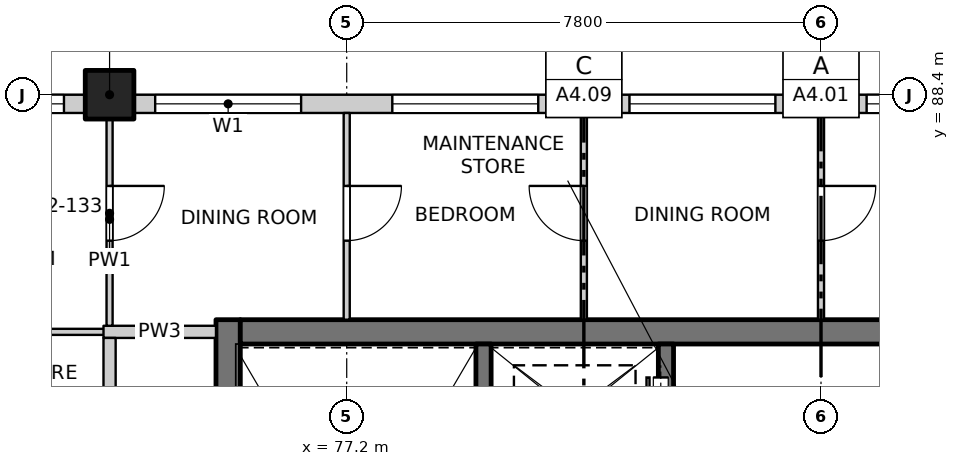
"""IFC4 building model, lengths in metres.
Left out: names, types, materials, properties, quantities, classifications, styles, units other than length and angle.
Written with IfcOpenShell. Run it as: python <this file> out.ifc"""

import sys

from ifc_helpers import new_model, si_unit, direction, frame, frame_2d, origin, origin_2d, place, context, subcontext, project, spatial, rectangle, extrude, element, fill, save


model = new_model("IFC4")
c1 = context("Model", 3, precision=1e-05, world=origin(), true_north=direction((0.0, 1.0)))
c2 = subcontext(c1, "Body", "Model", "MODEL_VIEW")
j1 = project(units=[si_unit("LENGTHUNIT", "METRE"), si_unit("PLANEANGLEUNIT", "RADIAN")], contexts=[c1])
p1 = place(None, origin())
s1 = spatial("IfcSite", under=j1, at=p1, CompositionType="ELEMENT")
p2 = place(p1, origin())
s2 = spatial("IfcBuilding", under=s1, at=p2, CompositionType="ELEMENT")
p3 = place(p2, frame((0.0, 0.0, 224.5)))
s3 = spatial("IfcBuildingStorey", under=s2, at=p3, CompositionType="ELEMENT", Elevation=224.5)
p4 = place(p3, frame((73.3, 88.4, -0.25), z_axis=(0.0, 0.0, 1.0), x_axis=(1.0, 0.0, 0.0)))
e1 = element("IfcColumn", 1, at=p4, inside=s3, PredefinedType="COLUMN", context=c2, shape_type="SweptSolid", body=[
    extrude(rectangle(XDim=0.8, YDim=0.8, at=origin_2d()), origin(), (0.0, 0.0, 1.0), 3.4),
])
p5 = place(p3, frame((75.25, 77.3, -0.25), z_axis=(0.0, 0.0, 1.0), x_axis=(0.0, 1.0, 0.0)))
e2 = element("IfcWall", 2, at=p5, inside=s3, PredefinedType="SOLIDWALL", context=c2, shape_type="SweptSolid", body=[
    extrude(rectangle(XDim=7.4, YDim=0.4, at=frame_2d((3.7, 0.0))), origin(), (0.0, 0.0, 1.0), 3.4),
])
p6 = place(p5, frame((0.3, 0.0, 0.25)))
e3 = element("IfcOpeningElement", 3, at=p6, cuts=e2, PredefinedType="OPENING", context=c2, shape_type="SweptSolid", body=[
    extrude(rectangle(XDim=1.2, YDim=2.1, at=frame_2d((0.6, 1.05))), frame((0.0, 0.21, 0.0), z_axis=(0.0, -1.0, 0.0), x_axis=(1.0, 0.0, 0.0)), (0.0, 0.0, 1.0), 0.42),
])
p7 = place(p3, frame((75.45, 84.5, -0.25), z_axis=(0.0, 0.0, 1.0), x_axis=(1.0, 0.0, 0.0)))
e4 = element("IfcWall", 4, at=p7, inside=s3, PredefinedType="SOLIDWALL", context=c2, shape_type="SweptSolid", body=[
    extrude(rectangle(XDim=19.1, YDim=0.4, at=frame_2d((9.55, 0.0))), origin(), (0.0, 0.0, 1.0), 3.4),
])
p8 = place(p3, frame((79.45, 77.3, -0.25), z_axis=(0.0, 0.0, 1.0), x_axis=(0.0, 1.0, 0.0)))
e5 = element("IfcWall", 5, at=p8, inside=s3, PredefinedType="SOLIDWALL", context=c2, shape_type="SweptSolid", body=[
    extrude(rectangle(XDim=7.0, YDim=0.25, at=frame_2d((3.5, 0.0))), origin(), (0.0, 0.0, 1.0), 3.4),
])
p9 = place(p3, frame((82.45, 82.025, -0.25), z_axis=(0.0, 0.0, 1.0), x_axis=(0.0, 1.0, 0.0)))
e6 = element("IfcWall", 6, at=p9, inside=s3, PredefinedType="SOLIDWALL", context=c2, shape_type="SweptSolid", body=[
    extrude(rectangle(XDim=2.275, YDim=0.25, at=frame_2d((1.138, 0.0))), origin(), (0.0, 0.0, 1.0), 3.4),
])
p10 = place(p9, frame((0.625, 0.0, 0.25)))
e7 = element("IfcOpeningElement", 7, at=p10, cuts=e6, PredefinedType="OPENING", context=c2, shape_type="SweptSolid", body=[
    extrude(rectangle(XDim=1.1, YDim=2.1, at=frame_2d((0.55, 1.05))), frame((0.0, 0.135, 0.0), z_axis=(0.0, -1.0, 0.0), x_axis=(1.0, 0.0, 0.0)), (0.0, 0.0, 1.0), 0.27),
])
p11 = place(p3, frame((65.5, 88.25, 0.0), z_axis=(0.0, 0.0, 1.0), x_axis=(1.0, 0.0, 0.0)))
e8 = element("IfcWall", 8, at=p11, inside=s3, PredefinedType="SOLIDWALL", context=c2, shape_type="SweptSolid", body=[
    extrude(rectangle(XDim=7.4, YDim=0.3, at=frame_2d((3.7, 0.0))), origin(), (0.0, 0.0, 1.0), 2.7),
])
p12 = place(p11, frame((0.75, 0.0, 0.9)))
e9 = element("IfcOpeningElement", 9, at=p12, cuts=e8, PredefinedType="OPENING", context=c2, shape_type="SweptSolid", body=[
    extrude(rectangle(XDim=2.4, YDim=1.8, at=frame_2d((1.2, 0.9))), frame((0.0, 0.16, 0.0), z_axis=(0.0, -1.0, 0.0), x_axis=(1.0, 0.0, 0.0)), (0.0, 0.0, 1.0), 0.32),
])
p13 = place(p11, frame((4.65, 0.0, 0.9)))
e10 = element("IfcOpeningElement", 10, at=p13, cuts=e8, PredefinedType="OPENING", context=c2, shape_type="SweptSolid", body=[
    extrude(rectangle(XDim=2.4, YDim=1.8, at=frame_2d((1.2, 0.9))), frame((0.0, 0.16, 0.0), z_axis=(0.0, -1.0, 0.0), x_axis=(1.0, 0.0, 0.0)), (0.0, 0.0, 1.0), 0.32),
])
p14 = place(p3, frame((73.7, 88.25, 0.0), z_axis=(0.0, 0.0, 1.0), x_axis=(1.0, 0.0, 0.0)))
e11 = element("IfcWall", 11, at=p14, inside=s3, PredefinedType="SOLIDWALL", context=c2, shape_type="SweptSolid", body=[
    extrude(rectangle(XDim=22.6, YDim=0.3, at=frame_2d((11.3, 0.0))), origin(), (0.0, 0.0, 1.0), 2.7),
])
p15 = place(p14, frame((0.35, 0.0, 0.9)))
e12 = element("IfcOpeningElement", 12, at=p15, cuts=e11, PredefinedType="OPENING", context=c2, shape_type="SweptSolid", body=[
    extrude(rectangle(XDim=2.4, YDim=1.8, at=frame_2d((1.2, 0.9))), frame((0.0, 0.16, 0.0), z_axis=(0.0, -1.0, 0.0), x_axis=(1.0, 0.0, 0.0)), (0.0, 0.0, 1.0), 0.32),
])
p16 = place(p14, frame((4.25, 0.0, 0.9)))
e13 = element("IfcOpeningElement", 13, at=p16, cuts=e11, PredefinedType="OPENING", context=c2, shape_type="SweptSolid", body=[
    extrude(rectangle(XDim=2.4, YDim=1.8, at=frame_2d((1.2, 0.9))), frame((0.0, 0.16, 0.0), z_axis=(0.0, -1.0, 0.0), x_axis=(1.0, 0.0, 0.0)), (0.0, 0.0, 1.0), 0.32),
])
p17 = place(p14, frame((8.15, 0.0, 0.9)))
e14 = element("IfcOpeningElement", 14, at=p17, cuts=e11, PredefinedType="OPENING", context=c2, shape_type="SweptSolid", body=[
    extrude(rectangle(XDim=2.4, YDim=1.8, at=frame_2d((1.2, 0.9))), frame((0.0, 0.16, 0.0), z_axis=(0.0, -1.0, 0.0), x_axis=(1.0, 0.0, 0.0)), (0.0, 0.0, 1.0), 0.32),
])
p18 = place(p14, frame((12.05, 0.0, 0.9)))
e15 = element("IfcOpeningElement", 15, at=p18, cuts=e11, PredefinedType="OPENING", context=c2, shape_type="SweptSolid", body=[
    extrude(rectangle(XDim=2.4, YDim=1.8, at=frame_2d((1.2, 0.9))), frame((0.0, 0.16, 0.0), z_axis=(0.0, -1.0, 0.0), x_axis=(1.0, 0.0, 0.0)), (0.0, 0.0, 1.0), 0.32),
])
p19 = place(p14, frame((15.95, 0.0, 0.9)))
e16 = element("IfcOpeningElement", 16, at=p19, cuts=e11, PredefinedType="OPENING", context=c2, shape_type="SweptSolid", body=[
    extrude(rectangle(XDim=2.4, YDim=1.8, at=frame_2d((1.2, 0.9))), frame((0.0, 0.16, 0.0), z_axis=(0.0, -1.0, 0.0), x_axis=(1.0, 0.0, 0.0)), (0.0, 0.0, 1.0), 0.32),
])
p20 = place(p14, frame((19.85, 0.0, 0.9)))
e17 = element("IfcOpeningElement", 17, at=p20, cuts=e11, PredefinedType="OPENING", context=c2, shape_type="SweptSolid", body=[
    extrude(rectangle(XDim=2.4, YDim=1.8, at=frame_2d((1.2, 0.9))), frame((0.0, 0.16, 0.0), z_axis=(0.0, -1.0, 0.0), x_axis=(1.0, 0.0, 0.0)), (0.0, 0.0, 1.0), 0.32),
])
p21 = place(p3, frame((61.9, 84.5, 0.0), z_axis=(0.0, 0.0, 1.0), x_axis=(1.0, 0.0, 0.0)))
e18 = element("IfcWall", 18, at=p21, inside=s3, PredefinedType="PARTITIONING", context=c2, shape_type="SweptSolid", body=[
    extrude(rectangle(XDim=11.5, YDim=0.1, at=frame_2d((5.75, 0.0))), origin(), (0.0, 0.0, 1.0), 3.15),
])
p22 = place(p21, frame((7.965, 0.0, 0.0)))
e19 = element("IfcOpeningElement", 19, at=p22, cuts=e18, PredefinedType="OPENING", context=c2, shape_type="SweptSolid", body=[
    extrude(rectangle(XDim=0.9, YDim=2.1, at=frame_2d((0.45, 1.05))), frame((0.0, 0.06, 0.0), z_axis=(0.0, -1.0, 0.0), x_axis=(1.0, 0.0, 0.0)), (0.0, 0.0, 1.0), 0.12),
])
p23 = place(p3, frame((73.2, 84.5, 0.0), z_axis=(0.0, 0.0, 1.0), x_axis=(1.0, 0.0, 0.0)))
e20 = element("IfcWall", 20, at=p23, inside=s3, PredefinedType="PARTITIONING", context=c2, shape_type="SweptSolid", body=[
    extrude(rectangle(XDim=1.85, YDim=0.2, at=frame_2d((0.925, 0.0))), origin(), (0.0, 0.0, 1.0), 3.15),
])
p24 = place(p3, frame((73.3, 49.5, 0.0), z_axis=(0.0, 0.0, 1.0), x_axis=(0.0, 1.0, 0.0)))
e21 = element("IfcWall", 21, at=p24, inside=s3, PredefinedType="PARTITIONING", context=c2, shape_type="SweptSolid", body=[
    extrude(rectangle(XDim=34.9, YDim=0.2, at=frame_2d((17.45, 0.0))), origin(), (0.0, 0.0, 1.0), 3.15),
])
p25 = place(p24, frame((3.575, 0.0, 0.0)))
e22 = element("IfcOpeningElement", 22, at=p25, cuts=e21, PredefinedType="OPENING", context=c2, shape_type="SweptSolid", body=[
    extrude(rectangle(XDim=1.0, YDim=2.1, at=frame_2d((0.5, 1.05))), frame((0.0, 0.11, 0.0), z_axis=(0.0, -1.0, 0.0), x_axis=(1.0, 0.0, 0.0)), (0.0, 0.0, 1.0), 0.22),
])
p26 = place(p24, frame((18.075, 0.0, 0.0)))
e23 = element("IfcOpeningElement", 23, at=p26, cuts=e21, PredefinedType="OPENING", context=c2, shape_type="SweptSolid", body=[
    extrude(rectangle(XDim=1.0, YDim=2.1, at=frame_2d((0.5, 1.05))), frame((0.0, 0.11, 0.0), z_axis=(0.0, -1.0, 0.0), x_axis=(1.0, 0.0, 0.0)), (0.0, 0.0, 1.0), 0.22),
])
p27 = place(p24, frame((26.175, 0.0, 0.0)))
e24 = element("IfcOpeningElement", 24, at=p27, cuts=e21, PredefinedType="OPENING", context=c2, shape_type="SweptSolid", body=[
    extrude(rectangle(XDim=1.0, YDim=2.1, at=frame_2d((0.5, 1.05))), frame((0.0, 0.11, 0.0), z_axis=(0.0, -1.0, 0.0), x_axis=(1.0, 0.0, 0.0)), (0.0, 0.0, 1.0), 0.22),
])
p28 = place(p3, frame((73.3, 84.6, 0.0), z_axis=(0.0, 0.0, 1.0), x_axis=(0.0, 1.0, 0.0)))
e25 = element("IfcWall", 25, at=p28, inside=s3, PredefinedType="PARTITIONING", context=c2, shape_type="SweptSolid", body=[
    extrude(rectangle(XDim=3.5, YDim=0.1, at=frame_2d((1.75, 0.0))), origin(), (0.0, 0.0, 1.0), 3.15),
])
p29 = place(p28, frame((1.4, 0.0, 0.0)))
e26 = element("IfcOpeningElement", 26, at=p29, cuts=e25, PredefinedType="OPENING", context=c2, shape_type="SweptSolid", body=[
    extrude(rectangle(XDim=0.9, YDim=2.1, at=frame_2d((0.45, 1.05))), frame((0.0, 0.06, 0.0), z_axis=(0.0, -1.0, 0.0), x_axis=(1.0, 0.0, 0.0)), (0.0, 0.0, 1.0), 0.12),
])
p30 = place(p3, frame((77.2, 84.7, 0.0), z_axis=(0.0, 0.0, 1.0), x_axis=(0.0, 1.0, 0.0)))
e27 = element("IfcWall", 27, at=p30, inside=s3, PredefinedType="PARTITIONING", context=c2, shape_type="SweptSolid", body=[
    extrude(rectangle(XDim=3.4, YDim=0.1, at=frame_2d((1.7, 0.0))), origin(), (0.0, 0.0, 1.0), 3.15),
])
p31 = place(p30, frame((1.3, 0.0, 0.0)))
e28 = element("IfcOpeningElement", 28, at=p31, cuts=e27, PredefinedType="OPENING", context=c2, shape_type="SweptSolid", body=[
    extrude(rectangle(XDim=0.9, YDim=2.1, at=frame_2d((0.45, 1.05))), frame((0.0, 0.06, 0.0), z_axis=(0.0, -1.0, 0.0), x_axis=(1.0, 0.0, 0.0)), (0.0, 0.0, 1.0), 0.12),
])
p32 = place(p3, frame((81.1, 84.7, 0.0), z_axis=(0.0, 0.0, 1.0), x_axis=(0.0, 1.0, 0.0)))
e29 = element("IfcWall", 29, at=p32, inside=s3, PredefinedType="PARTITIONING", context=c2, shape_type="SweptSolid", body=[
    extrude(rectangle(XDim=3.4, YDim=0.1, at=frame_2d((1.7, 0.0))), origin(), (0.0, 0.0, 1.0), 3.15),
])
p33 = place(p32, frame((1.3, 0.0, 0.0)))
e30 = element("IfcOpeningElement", 30, at=p33, cuts=e29, PredefinedType="OPENING", context=c2, shape_type="SweptSolid", body=[
    extrude(rectangle(XDim=0.9, YDim=2.1, at=frame_2d((0.45, 1.05))), frame((0.0, 0.06, 0.0), z_axis=(0.0, -1.0, 0.0), x_axis=(1.0, 0.0, 0.0)), (0.0, 0.0, 1.0), 0.12),
])
p34 = place(p3, frame((85.0, 84.7, 0.0), z_axis=(0.0, 0.0, 1.0), x_axis=(0.0, 1.0, 0.0)))
e31 = element("IfcWall", 31, at=p34, inside=s3, PredefinedType="PARTITIONING", context=c2, shape_type="SweptSolid", body=[
    extrude(rectangle(XDim=3.4, YDim=0.1, at=frame_2d((1.7, 0.0))), origin(), (0.0, 0.0, 1.0), 3.15),
])
p35 = place(p34, frame((1.3, 0.0, 0.0)))
e32 = element("IfcOpeningElement", 32, at=p35, cuts=e31, PredefinedType="OPENING", context=c2, shape_type="SweptSolid", body=[
    extrude(rectangle(XDim=0.9, YDim=2.1, at=frame_2d((0.45, 1.05))), frame((0.0, 0.06, 0.0), z_axis=(0.0, -1.0, 0.0), x_axis=(1.0, 0.0, 0.0)), (0.0, 0.0, 1.0), 0.12),
])
p36 = place(p13, origin())
e33 = element("IfcWindow", 33, at=p36, inside=s3, PartitioningType="DOUBLE_PANEL_VERTICAL", PredefinedType="WINDOW", context=c2, shape_type="SweptSolid", body=[
    extrude(rectangle(XDim=2.4, YDim=1.8, at=frame_2d((1.2, 0.9))), frame((0.0, 0.03, 0.0), z_axis=(0.0, -1.0, 0.0), x_axis=(1.0, 0.0, 0.0)), (0.0, 0.0, 1.0), 0.06),
])
fill(e10, e33)
p37 = place(p15, origin())
e34 = element("IfcWindow", 34, at=p37, inside=s3, PartitioningType="DOUBLE_PANEL_VERTICAL", PredefinedType="WINDOW", context=c2, shape_type="SweptSolid", body=[
    extrude(rectangle(XDim=2.4, YDim=1.8, at=frame_2d((1.2, 0.9))), frame((0.0, 0.03, 0.0), z_axis=(0.0, -1.0, 0.0), x_axis=(1.0, 0.0, 0.0)), (0.0, 0.0, 1.0), 0.06),
])
fill(e12, e34)
p38 = place(p16, origin())
e35 = element("IfcWindow", 35, at=p38, inside=s3, PartitioningType="DOUBLE_PANEL_VERTICAL", PredefinedType="WINDOW", context=c2, shape_type="SweptSolid", body=[
    extrude(rectangle(XDim=2.4, YDim=1.8, at=frame_2d((1.2, 0.9))), frame((0.0, 0.03, 0.0), z_axis=(0.0, -1.0, 0.0), x_axis=(1.0, 0.0, 0.0)), (0.0, 0.0, 1.0), 0.06),
])
fill(e13, e35)
p39 = place(p17, origin())
e36 = element("IfcWindow", 36, at=p39, inside=s3, PartitioningType="DOUBLE_PANEL_VERTICAL", PredefinedType="WINDOW", context=c2, shape_type="SweptSolid", body=[
    extrude(rectangle(XDim=2.4, YDim=1.8, at=frame_2d((1.2, 0.9))), frame((0.0, 0.03, 0.0), z_axis=(0.0, -1.0, 0.0), x_axis=(1.0, 0.0, 0.0)), (0.0, 0.0, 1.0), 0.06),
])
fill(e14, e36)
p40 = place(p18, origin())
e37 = element("IfcWindow", 37, at=p40, inside=s3, PartitioningType="DOUBLE_PANEL_VERTICAL", PredefinedType="WINDOW", context=c2, shape_type="SweptSolid", body=[
    extrude(rectangle(XDim=2.4, YDim=1.8, at=frame_2d((1.2, 0.9))), frame((0.0, 0.03, 0.0), z_axis=(0.0, -1.0, 0.0), x_axis=(1.0, 0.0, 0.0)), (0.0, 0.0, 1.0), 0.06),
])
fill(e15, e37)
p41 = place(p10, origin())
e38 = element("IfcDoor", 38, at=p41, inside=s3, OperationType="SLIDING_TO_RIGHT", PredefinedType="DOOR", context=c2, shape_type="SweptSolid", body=[
    extrude(rectangle(XDim=1.1, YDim=2.1, at=frame_2d((0.55, 1.05))), frame((0.0, 0.11, 0.0), z_axis=(0.0, -1.0, 0.0), x_axis=(1.0, 0.0, 0.0)), (0.0, 0.0, 1.0), 0.05),
])
fill(e7, e38)
p42 = place(p29, origin())
e39 = element("IfcDoor", 39, at=p42, inside=s3, OperationType="SINGLE_SWING_LEFT", PredefinedType="DOOR", context=c2, shape_type="SweptSolid", body=[
    extrude(rectangle(XDim=0.9, YDim=2.1, at=frame_2d((0.45, 1.05))), frame((0.0, 0.025, 0.0), z_axis=(0.0, -1.0, 0.0), x_axis=(1.0, 0.0, 0.0)), (0.0, 0.0, 1.0), 0.05),
])
fill(e26, e39)
p43 = place(p31, origin())
e40 = element("IfcDoor", 40, at=p43, inside=s3, OperationType="SINGLE_SWING_LEFT", PredefinedType="DOOR", context=c2, shape_type="SweptSolid", body=[
    extrude(rectangle(XDim=0.9, YDim=2.1, at=frame_2d((0.45, 1.05))), frame((0.0, 0.025, 0.0), z_axis=(0.0, -1.0, 0.0), x_axis=(1.0, 0.0, 0.0)), (0.0, 0.0, 1.0), 0.05),
])
fill(e28, e40)
p44 = place(p33, origin())
e41 = element("IfcDoor", 41, at=p44, inside=s3, OperationType="SINGLE_SWING_RIGHT", PredefinedType="DOOR", context=c2, shape_type="SweptSolid", body=[
    extrude(rectangle(XDim=0.9, YDim=2.1, at=frame_2d((0.45, 1.05))), frame((0.0, 0.025, 0.0), z_axis=(0.0, -1.0, 0.0), x_axis=(1.0, 0.0, 0.0)), (0.0, 0.0, 1.0), 0.05),
])
fill(e30, e41)
p45 = place(p35, origin())
e42 = element("IfcDoor", 42, at=p45, inside=s3, OperationType="SINGLE_SWING_LEFT", PredefinedType="DOOR", context=c2, shape_type="SweptSolid", body=[
    extrude(rectangle(XDim=0.9, YDim=2.1, at=frame_2d((0.45, 1.05))), frame((0.0, 0.025, 0.0), z_axis=(0.0, -1.0, 0.0), x_axis=(1.0, 0.0, 0.0)), (0.0, 0.0, 1.0), 0.05),
])
fill(e32, e42)
save(model, sys.argv[1])
